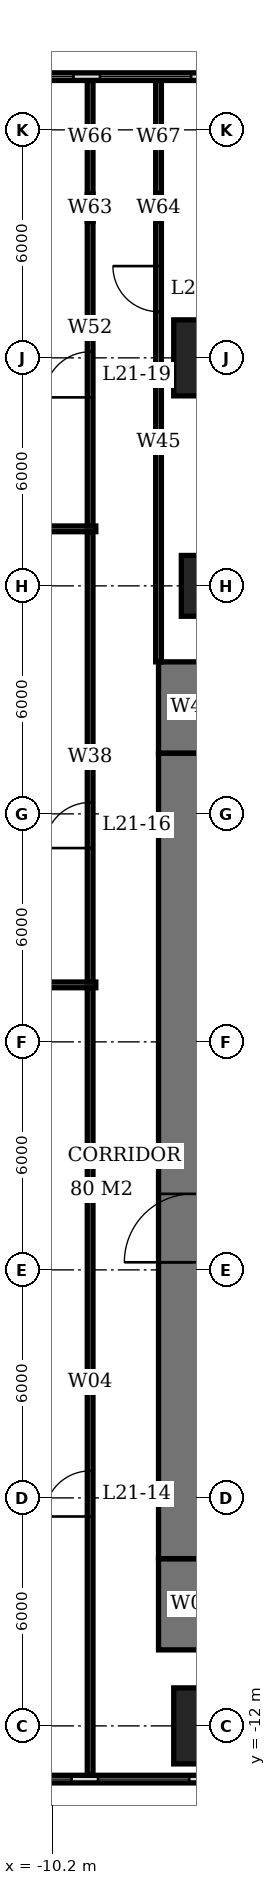
"""IFC4 building model, lengths in metres.
Left out: names, types, materials, properties, quantities, classifications, styles, units other than length and angle.
Written with IfcOpenShell. Run it as: python <this file> out.ifc"""

import sys

from ifc_helpers import new_model, si_unit, direction, frame, frame_2d, origin, origin_2d, place, context, subcontext, project, spatial, rectangle, extrude, element, fill, save


model = new_model("IFC4")
c1 = context("Model", 3, precision=1e-05, world=origin(), true_north=direction((0.0, 1.0)))
c2 = subcontext(c1, "Body", "Model", "MODEL_VIEW")
j1 = project(units=[si_unit("LENGTHUNIT", "METRE"), si_unit("PLANEANGLEUNIT", "RADIAN")], contexts=[c1])
p1 = place(None, origin())
s1 = spatial("IfcSite", under=j1, at=p1, CompositionType="ELEMENT")
p2 = place(p1, origin())
s2 = spatial("IfcBuilding", under=s1, at=p2, CompositionType="ELEMENT")
p3 = place(p2, frame((0.0, 0.0, 88.4)))
s3 = spatial("IfcBuildingStorey", under=s2, at=p3, CompositionType="ELEMENT", Elevation=88.4)
p4 = place(p3, frame((-6.0, -12.0, 0.0), z_axis=(0.0, 0.0, 1.0), x_axis=(1.0, 0.0, 0.0)))
e1 = element("IfcColumn", 1, at=p4, inside=s3, PredefinedType="COLUMN", context=c2, shape_type="SweptSolid", body=[
    extrude(rectangle(XDim=2.0, YDim=2.0, at=origin_2d()), origin(), (0.0, 0.0, 1.0), 5.4),
])
p5 = place(p3, frame((-6.0, 18.0, 0.0), z_axis=(0.0, 0.0, 1.0), x_axis=(1.0, 0.0, 0.0)))
e2 = element("IfcColumn", 2, at=p5, inside=s3, PredefinedType="COLUMN", context=c2, shape_type="SweptSolid", body=[
    extrude(rectangle(XDim=1.6, YDim=1.6, at=origin_2d()), origin(), (0.0, 0.0, 1.0), 5.4),
])
p6 = place(p3, frame((-6.0, 24.0, 0.0), z_axis=(0.0, 0.0, 1.0), x_axis=(1.0, 0.0, 0.0)))
e3 = element("IfcColumn", 3, at=p6, inside=s3, PredefinedType="COLUMN", context=c2, shape_type="SweptSolid", body=[
    extrude(rectangle(XDim=2.0, YDim=2.0, at=origin_2d()), origin(), (0.0, 0.0, 1.0), 5.4),
])
p7 = place(p3, frame((-6.5, -7.6, 0.0), z_axis=(0.0, 0.0, 1.0), x_axis=(0.0, 1.0, 0.0)))
e4 = element("IfcWall", 4, at=p7, inside=s3, PredefinedType="SHEAR", context=c2, shape_type="SweptSolid", body=[
    extrude(rectangle(XDim=21.2, YDim=1.8, at=frame_2d((10.6, 0.0))), origin(), (0.0, 0.0, 1.0), 5.4),
])
p8 = place(p7, frame((7.8, 0.0, 0.0)))
e5 = element("IfcOpeningElement", 5, at=p8, cuts=e4, PredefinedType="OPENING", context=c2, shape_type="SweptSolid", body=[
    extrude(rectangle(XDim=1.8, YDim=2.4, at=frame_2d((0.9, 1.2))), frame((0.0, 0.91, 0.0), z_axis=(0.0, -1.0, 0.0), x_axis=(1.0, 0.0, 0.0)), (0.0, 0.0, 1.0), 1.82),
])
for number, where, z_axis, x_axis in (
    (6, (-6.5, -10.0, 0.0), (0.0, 0.0, 1.0), (0.0, 1.0, 0.0)),
    (7, (-6.5, 13.6, 0.0), (0.0, 0.0, 1.0), (0.0, 1.0, 0.0)),
):
    element("IfcWall", number, at=place(p3, frame(where, z_axis=z_axis, x_axis=x_axis)), inside=s3, PredefinedType="SHEAR", context=c2, shape_type="SweptSolid", body=[
        extrude(rectangle(XDim=2.4, YDim=1.8, at=frame_2d((1.2, 0.0))), origin(), (0.0, 0.0, 1.0), 5.4),
    ])
p9 = place(p3, frame((-18.63, -13.4, 0.0), z_axis=(0.0, 0.0, 1.0), x_axis=(1.0, 0.0, 0.0)))
e8 = element("IfcWall", 8, at=p9, inside=s3, PredefinedType="USERDEFINED", context=c2, shape_type="SweptSolid", body=[
    extrude(rectangle(XDim=37.26, YDim=0.2, at=frame_2d((18.63, 0.0))), origin(), (0.0, 0.0, 1.0), 5.4),
])
p10 = place(p9, frame((0.348, 0.0, 0.6)))
e9 = element("IfcOpeningElement", 9, at=p10, cuts=e8, PredefinedType="OPENING", context=c2, shape_type="SweptSolid", body=[
    extrude(rectangle(XDim=2.4, YDim=3.0, at=frame_2d((1.2, 1.5))), frame((0.0, 0.11, 0.0), z_axis=(0.0, -1.0, 0.0), x_axis=(1.0, 0.0, 0.0)), (0.0, 0.0, 1.0), 0.22),
])
p11 = place(p9, frame((3.445, 0.0, 0.6)))
e10 = element("IfcOpeningElement", 10, at=p11, cuts=e8, PredefinedType="OPENING", context=c2, shape_type="SweptSolid", body=[
    extrude(rectangle(XDim=2.4, YDim=3.0, at=frame_2d((1.2, 1.5))), frame((0.0, 0.11, 0.0), z_axis=(0.0, -1.0, 0.0), x_axis=(1.0, 0.0, 0.0)), (0.0, 0.0, 1.0), 0.22),
])
p12 = place(p9, frame((6.542, 0.0, 0.6)))
e11 = element("IfcOpeningElement", 11, at=p12, cuts=e8, PredefinedType="OPENING", context=c2, shape_type="SweptSolid", body=[
    extrude(rectangle(XDim=2.4, YDim=3.0, at=frame_2d((1.2, 1.5))), frame((0.0, 0.11, 0.0), z_axis=(0.0, -1.0, 0.0), x_axis=(1.0, 0.0, 0.0)), (0.0, 0.0, 1.0), 0.22),
])
p13 = place(p9, frame((9.638, 0.0, 0.6)))
e12 = element("IfcOpeningElement", 12, at=p13, cuts=e8, PredefinedType="OPENING", context=c2, shape_type="SweptSolid", body=[
    extrude(rectangle(XDim=2.4, YDim=3.0, at=frame_2d((1.2, 1.5))), frame((0.0, 0.11, 0.0), z_axis=(0.0, -1.0, 0.0), x_axis=(1.0, 0.0, 0.0)), (0.0, 0.0, 1.0), 0.22),
])
p14 = place(p9, frame((12.735, 0.0, 0.6)))
e13 = element("IfcOpeningElement", 13, at=p14, cuts=e8, PredefinedType="OPENING", context=c2, shape_type="SweptSolid", body=[
    extrude(rectangle(XDim=2.4, YDim=3.0, at=frame_2d((1.2, 1.5))), frame((0.0, 0.11, 0.0), z_axis=(0.0, -1.0, 0.0), x_axis=(1.0, 0.0, 0.0)), (0.0, 0.0, 1.0), 0.22),
])
p15 = place(p9, frame((16.582, 0.0, 0.0)))
e14 = element("IfcOpeningElement", 14, at=p15, cuts=e8, PredefinedType="OPENING", context=c2, shape_type="SweptSolid", body=[
    extrude(rectangle(XDim=1.0, YDim=2.1, at=frame_2d((0.5, 1.05))), frame((0.0, 0.11, 0.0), z_axis=(0.0, -1.0, 0.0), x_axis=(1.0, 0.0, 0.0)), (0.0, 0.0, 1.0), 0.22),
])
p16 = place(p9, frame((18.928, 0.0, 0.6)))
e15 = element("IfcOpeningElement", 15, at=p16, cuts=e8, PredefinedType="OPENING", context=c2, shape_type="SweptSolid", body=[
    extrude(rectangle(XDim=2.4, YDim=3.0, at=frame_2d((1.2, 1.5))), frame((0.0, 0.11, 0.0), z_axis=(0.0, -1.0, 0.0), x_axis=(1.0, 0.0, 0.0)), (0.0, 0.0, 1.0), 0.22),
])
p17 = place(p9, frame((22.025, 0.0, 0.6)))
e16 = element("IfcOpeningElement", 16, at=p17, cuts=e8, PredefinedType="OPENING", context=c2, shape_type="SweptSolid", body=[
    extrude(rectangle(XDim=2.4, YDim=3.0, at=frame_2d((1.2, 1.5))), frame((0.0, 0.11, 0.0), z_axis=(0.0, -1.0, 0.0), x_axis=(1.0, 0.0, 0.0)), (0.0, 0.0, 1.0), 0.22),
])
p18 = place(p9, frame((25.122, 0.0, 0.6)))
e17 = element("IfcOpeningElement", 17, at=p18, cuts=e8, PredefinedType="OPENING", context=c2, shape_type="SweptSolid", body=[
    extrude(rectangle(XDim=2.4, YDim=3.0, at=frame_2d((1.2, 1.5))), frame((0.0, 0.11, 0.0), z_axis=(0.0, -1.0, 0.0), x_axis=(1.0, 0.0, 0.0)), (0.0, 0.0, 1.0), 0.22),
])
p19 = place(p9, frame((28.218, 0.0, 0.6)))
e18 = element("IfcOpeningElement", 18, at=p19, cuts=e8, PredefinedType="OPENING", context=c2, shape_type="SweptSolid", body=[
    extrude(rectangle(XDim=2.4, YDim=3.0, at=frame_2d((1.2, 1.5))), frame((0.0, 0.11, 0.0), z_axis=(0.0, -1.0, 0.0), x_axis=(1.0, 0.0, 0.0)), (0.0, 0.0, 1.0), 0.22),
])
p20 = place(p9, frame((31.315, 0.0, 0.6)))
e19 = element("IfcOpeningElement", 19, at=p20, cuts=e8, PredefinedType="OPENING", context=c2, shape_type="SweptSolid", body=[
    extrude(rectangle(XDim=2.4, YDim=3.0, at=frame_2d((1.2, 1.5))), frame((0.0, 0.11, 0.0), z_axis=(0.0, -1.0, 0.0), x_axis=(1.0, 0.0, 0.0)), (0.0, 0.0, 1.0), 0.22),
])
p21 = place(p9, frame((34.412, 0.0, 0.6)))
e20 = element("IfcOpeningElement", 20, at=p21, cuts=e8, PredefinedType="OPENING", context=c2, shape_type="SweptSolid", body=[
    extrude(rectangle(XDim=2.4, YDim=3.0, at=frame_2d((1.2, 1.5))), frame((0.0, 0.11, 0.0), z_axis=(0.0, -1.0, 0.0), x_axis=(1.0, 0.0, 0.0)), (0.0, 0.0, 1.0), 0.22),
])
p22 = place(p3, frame((18.58, 31.4, 0.0), z_axis=(0.0, 0.0, 1.0), x_axis=(-1.0, 0.0, 0.0)))
e21 = element("IfcWall", 21, at=p22, inside=s3, PredefinedType="USERDEFINED", context=c2, shape_type="SweptSolid", body=[
    extrude(rectangle(XDim=37.16, YDim=0.2, at=frame_2d((18.58, 0.0))), origin(), (0.0, 0.0, 1.0), 5.4),
])
p23 = place(p22, frame((0.348, 0.0, 0.6)))
e22 = element("IfcOpeningElement", 22, at=p23, cuts=e21, PredefinedType="OPENING", context=c2, shape_type="SweptSolid", body=[
    extrude(rectangle(XDim=2.4, YDim=3.0, at=frame_2d((1.2, 1.5))), frame((0.0, 0.11, 0.0), z_axis=(0.0, -1.0, 0.0), x_axis=(1.0, 0.0, 0.0)), (0.0, 0.0, 1.0), 0.22),
])
p24 = place(p22, frame((3.445, 0.0, 0.6)))
e23 = element("IfcOpeningElement", 23, at=p24, cuts=e21, PredefinedType="OPENING", context=c2, shape_type="SweptSolid", body=[
    extrude(rectangle(XDim=2.4, YDim=3.0, at=frame_2d((1.2, 1.5))), frame((0.0, 0.11, 0.0), z_axis=(0.0, -1.0, 0.0), x_axis=(1.0, 0.0, 0.0)), (0.0, 0.0, 1.0), 0.22),
])
p25 = place(p22, frame((6.542, 0.0, 0.6)))
e24 = element("IfcOpeningElement", 24, at=p25, cuts=e21, PredefinedType="OPENING", context=c2, shape_type="SweptSolid", body=[
    extrude(rectangle(XDim=2.4, YDim=3.0, at=frame_2d((1.2, 1.5))), frame((0.0, 0.11, 0.0), z_axis=(0.0, -1.0, 0.0), x_axis=(1.0, 0.0, 0.0)), (0.0, 0.0, 1.0), 0.22),
])
p26 = place(p22, frame((9.638, 0.0, 0.6)))
e25 = element("IfcOpeningElement", 25, at=p26, cuts=e21, PredefinedType="OPENING", context=c2, shape_type="SweptSolid", body=[
    extrude(rectangle(XDim=2.4, YDim=3.0, at=frame_2d((1.2, 1.5))), frame((0.0, 0.11, 0.0), z_axis=(0.0, -1.0, 0.0), x_axis=(1.0, 0.0, 0.0)), (0.0, 0.0, 1.0), 0.22),
])
p27 = place(p22, frame((12.735, 0.0, 0.6)))
e26 = element("IfcOpeningElement", 26, at=p27, cuts=e21, PredefinedType="OPENING", context=c2, shape_type="SweptSolid", body=[
    extrude(rectangle(XDim=2.4, YDim=3.0, at=frame_2d((1.2, 1.5))), frame((0.0, 0.11, 0.0), z_axis=(0.0, -1.0, 0.0), x_axis=(1.0, 0.0, 0.0)), (0.0, 0.0, 1.0), 0.22),
])
p28 = place(p22, frame((15.832, 0.0, 0.6)))
e27 = element("IfcOpeningElement", 27, at=p28, cuts=e21, PredefinedType="OPENING", context=c2, shape_type="SweptSolid", body=[
    extrude(rectangle(XDim=2.4, YDim=3.0, at=frame_2d((1.2, 1.5))), frame((0.0, 0.11, 0.0), z_axis=(0.0, -1.0, 0.0), x_axis=(1.0, 0.0, 0.0)), (0.0, 0.0, 1.0), 0.22),
])
p29 = place(p22, frame((18.928, 0.0, 0.6)))
e28 = element("IfcOpeningElement", 28, at=p29, cuts=e21, PredefinedType="OPENING", context=c2, shape_type="SweptSolid", body=[
    extrude(rectangle(XDim=2.4, YDim=3.0, at=frame_2d((1.2, 1.5))), frame((0.0, 0.11, 0.0), z_axis=(0.0, -1.0, 0.0), x_axis=(1.0, 0.0, 0.0)), (0.0, 0.0, 1.0), 0.22),
])
p30 = place(p22, frame((22.025, 0.0, 0.6)))
e29 = element("IfcOpeningElement", 29, at=p30, cuts=e21, PredefinedType="OPENING", context=c2, shape_type="SweptSolid", body=[
    extrude(rectangle(XDim=2.4, YDim=3.0, at=frame_2d((1.2, 1.5))), frame((0.0, 0.11, 0.0), z_axis=(0.0, -1.0, 0.0), x_axis=(1.0, 0.0, 0.0)), (0.0, 0.0, 1.0), 0.22),
])
p31 = place(p22, frame((25.122, 0.0, 0.6)))
e30 = element("IfcOpeningElement", 30, at=p31, cuts=e21, PredefinedType="OPENING", context=c2, shape_type="SweptSolid", body=[
    extrude(rectangle(XDim=2.4, YDim=3.0, at=frame_2d((1.2, 1.5))), frame((0.0, 0.11, 0.0), z_axis=(0.0, -1.0, 0.0), x_axis=(1.0, 0.0, 0.0)), (0.0, 0.0, 1.0), 0.22),
])
p32 = place(p22, frame((28.218, 0.0, 0.6)))
e31 = element("IfcOpeningElement", 31, at=p32, cuts=e21, PredefinedType="OPENING", context=c2, shape_type="SweptSolid", body=[
    extrude(rectangle(XDim=2.4, YDim=3.0, at=frame_2d((1.2, 1.5))), frame((0.0, 0.11, 0.0), z_axis=(0.0, -1.0, 0.0), x_axis=(1.0, 0.0, 0.0)), (0.0, 0.0, 1.0), 0.22),
])
p33 = place(p22, frame((31.315, 0.0, 0.6)))
e32 = element("IfcOpeningElement", 32, at=p33, cuts=e21, PredefinedType="OPENING", context=c2, shape_type="SweptSolid", body=[
    extrude(rectangle(XDim=2.4, YDim=3.0, at=frame_2d((1.2, 1.5))), frame((0.0, 0.11, 0.0), z_axis=(0.0, -1.0, 0.0), x_axis=(1.0, 0.0, 0.0)), (0.0, 0.0, 1.0), 0.22),
])
p34 = place(p22, frame((34.412, 0.0, 0.6)))
e33 = element("IfcOpeningElement", 33, at=p34, cuts=e21, PredefinedType="OPENING", context=c2, shape_type="SweptSolid", body=[
    extrude(rectangle(XDim=2.4, YDim=3.0, at=frame_2d((1.2, 1.5))), frame((0.0, 0.11, 0.0), z_axis=(0.0, -1.0, 0.0), x_axis=(1.0, 0.0, 0.0)), (0.0, 0.0, 1.0), 0.22),
])
p35 = place(p3, frame((-21.59, 7.5, 0.0), z_axis=(0.0, 0.0, 1.0), x_axis=(1.0, 0.0, 0.0)))
e34 = element("IfcWall", 34, at=p35, inside=s3, PredefinedType="PARTITIONING", context=c2, shape_type="SweptSolid", body=[
    extrude(rectangle(XDim=12.54, YDim=0.15, at=frame_2d((6.27, 0.0))), origin(), (0.0, 0.0, 1.0), 5.15),
])
p36 = place(p3, frame((-17.708, 19.5, 0.0), z_axis=(0.0, 0.0, 1.0), x_axis=(1.0, 0.0, 0.0)))
e35 = element("IfcWall", 35, at=p36, inside=s3, PredefinedType="PARTITIONING", context=c2, shape_type="SweptSolid", body=[
    extrude(rectangle(XDim=8.658, YDim=0.15, at=frame_2d((4.329, 0.0))), origin(), (0.0, 0.0, 1.0), 5.15),
])
p37 = place(p3, frame((-9.2, -13.3, 0.0), z_axis=(0.0, 0.0, 1.0), x_axis=(0.0, 1.0, 0.0)))
e36 = element("IfcWall", 36, at=p37, inside=s3, PredefinedType="PARTITIONING", context=c2, shape_type="SweptSolid", body=[
    extrude(rectangle(XDim=20.725, YDim=0.15, at=frame_2d((10.363, 0.0))), origin(), (0.0, 0.0, 1.0), 5.15),
])
p38 = place(p37, frame((6.81, 0.0, 0.0)))
e37 = element("IfcOpeningElement", 37, at=p38, cuts=e36, PredefinedType="OPENING", context=c2, shape_type="SweptSolid", body=[
    extrude(rectangle(XDim=1.2, YDim=2.4, at=frame_2d((0.6, 1.2))), frame((0.0, 0.085, 0.0), z_axis=(0.0, -1.0, 0.0), x_axis=(1.0, 0.0, 0.0)), (0.0, 0.0, 1.0), 0.17),
])
p39 = place(p3, frame((-9.2, 7.575, 0.0), z_axis=(0.0, 0.0, 1.0), x_axis=(0.0, 1.0, 0.0)))
e38 = element("IfcWall", 38, at=p39, inside=s3, PredefinedType="PARTITIONING", context=c2, shape_type="SweptSolid", body=[
    extrude(rectangle(XDim=11.85, YDim=0.15, at=frame_2d((5.925, 0.0))), origin(), (0.0, 0.0, 1.0), 5.15),
])
p40 = place(p39, frame((3.525, 0.0, 0.0)))
e39 = element("IfcOpeningElement", 39, at=p40, cuts=e38, PredefinedType="OPENING", context=c2, shape_type="SweptSolid", body=[
    extrude(rectangle(XDim=1.2, YDim=2.4, at=frame_2d((0.6, 1.2))), frame((0.0, 0.085, 0.0), z_axis=(0.0, -1.0, 0.0), x_axis=(1.0, 0.0, 0.0)), (0.0, 0.0, 1.0), 0.17),
])
p41 = place(p3, frame((-9.2, 19.575, 0.0), z_axis=(0.0, 0.0, 1.0), x_axis=(0.0, 1.0, 0.0)))
e40 = element("IfcWall", 40, at=p41, inside=s3, PredefinedType="PARTITIONING", context=c2, shape_type="SweptSolid", body=[
    extrude(rectangle(XDim=8.015, YDim=0.15, at=frame_2d((4.008, 0.0))), origin(), (0.0, 0.0, 1.0), 5.15),
])
p42 = place(p41, frame((3.385, 0.0, 0.0)))
e41 = element("IfcOpeningElement", 41, at=p42, cuts=e40, PredefinedType="OPENING", context=c2, shape_type="SweptSolid", body=[
    extrude(rectangle(XDim=1.2, YDim=2.4, at=frame_2d((0.6, 1.2))), frame((0.0, 0.085, 0.0), z_axis=(0.0, -1.0, 0.0), x_axis=(1.0, 0.0, 0.0)), (0.0, 0.0, 1.0), 0.17),
])
p43 = place(p3, frame((-9.2, 27.59, 0.0), z_axis=(0.0, 0.0, 1.0), x_axis=(0.0, 1.0, 0.0)))
e42 = element("IfcWall", 42, at=p43, inside=s3, PredefinedType="PARTITIONING", context=c2, shape_type="SweptSolid", body=[
    extrude(rectangle(XDim=0.72, YDim=0.15, at=frame_2d((0.36, 0.0))), origin(), (0.0, 0.0, 1.0), 4.15),
])
p44 = place(p3, frame((-9.2, 28.31, 0.0), z_axis=(0.0, 0.0, 1.0), x_axis=(0.0, 1.0, 0.0)))
e43 = element("IfcWall", 43, at=p44, inside=s3, PredefinedType="PARTITIONING", context=c2, shape_type="SweptSolid", body=[
    extrude(rectangle(XDim=2.99, YDim=0.15, at=frame_2d((1.495, 0.0))), origin(), (0.0, 0.0, 1.0), 5.15),
])
p45 = place(p3, frame((-7.4, 16.0, 0.0), z_axis=(0.0, 0.0, 1.0), x_axis=(0.0, 1.0, 0.0)))
e44 = element("IfcWall", 44, at=p45, inside=s3, PredefinedType="PARTITIONING", context=c2, shape_type="SweptSolid", body=[
    extrude(rectangle(XDim=11.59, YDim=0.15, at=frame_2d((5.795, 0.0))), origin(), (0.0, 0.0, 1.0), 5.15),
])
p46 = place(p45, frame((9.215, 0.0, 0.0)))
e45 = element("IfcOpeningElement", 45, at=p46, cuts=e44, PredefinedType="OPENING", context=c2, shape_type="SweptSolid", body=[
    extrude(rectangle(XDim=1.2, YDim=2.4, at=frame_2d((0.6, 1.2))), frame((0.0, 0.085, 0.0), z_axis=(0.0, -1.0, 0.0), x_axis=(1.0, 0.0, 0.0)), (0.0, 0.0, 1.0), 0.17),
])
p47 = place(p3, frame((-7.4, 27.59, 0.0), z_axis=(0.0, 0.0, 1.0), x_axis=(0.0, 1.0, 0.0)))
e46 = element("IfcWall", 46, at=p47, inside=s3, PredefinedType="PARTITIONING", context=c2, shape_type="SweptSolid", body=[
    extrude(rectangle(XDim=0.72, YDim=0.15, at=frame_2d((0.36, 0.0))), origin(), (0.0, 0.0, 1.0), 4.15),
])
p48 = place(p3, frame((-7.4, 28.31, 0.0), z_axis=(0.0, 0.0, 1.0), x_axis=(0.0, 1.0, 0.0)))
e47 = element("IfcWall", 47, at=p48, inside=s3, PredefinedType="PARTITIONING", context=c2, shape_type="SweptSolid", body=[
    extrude(rectangle(XDim=2.99, YDim=0.15, at=frame_2d((1.495, 0.0))), origin(), (0.0, 0.0, 1.0), 5.15),
])
p49 = place(p12, origin())
e48 = element("IfcWindow", 48, at=p49, inside=s3, PartitioningType="SINGLE_PANEL", PredefinedType="USERDEFINED", context=c2, shape_type="SweptSolid", body=[
    extrude(rectangle(XDim=2.4, YDim=3.0, at=frame_2d((1.2, 1.5))), frame((0.0, 0.03, 0.0), z_axis=(0.0, -1.0, 0.0), x_axis=(1.0, 0.0, 0.0)), (0.0, 0.0, 1.0), 0.06),
])
fill(e11, e48)
p50 = place(p13, origin())
e49 = element("IfcWindow", 49, at=p50, inside=s3, PartitioningType="SINGLE_PANEL", PredefinedType="USERDEFINED", context=c2, shape_type="SweptSolid", body=[
    extrude(rectangle(XDim=2.4, YDim=3.0, at=frame_2d((1.2, 1.5))), frame((0.0, 0.03, 0.0), z_axis=(0.0, -1.0, 0.0), x_axis=(1.0, 0.0, 0.0)), (0.0, 0.0, 1.0), 0.06),
])
fill(e12, e49)
p51 = place(p31, origin())
e50 = element("IfcWindow", 50, at=p51, inside=s3, PartitioningType="SINGLE_PANEL", PredefinedType="USERDEFINED", context=c2, shape_type="SweptSolid", body=[
    extrude(rectangle(XDim=2.4, YDim=3.0, at=frame_2d((1.2, 1.5))), frame((0.0, 0.03, 0.0), z_axis=(0.0, -1.0, 0.0), x_axis=(1.0, 0.0, 0.0)), (0.0, 0.0, 1.0), 0.06),
])
fill(e30, e50)
p52 = place(p32, origin())
e51 = element("IfcWindow", 51, at=p52, inside=s3, PartitioningType="SINGLE_PANEL", PredefinedType="USERDEFINED", context=c2, shape_type="SweptSolid", body=[
    extrude(rectangle(XDim=2.4, YDim=3.0, at=frame_2d((1.2, 1.5))), frame((0.0, 0.03, 0.0), z_axis=(0.0, -1.0, 0.0), x_axis=(1.0, 0.0, 0.0)), (0.0, 0.0, 1.0), 0.06),
])
fill(e31, e51)
p53 = place(p8, origin())
e52 = element("IfcDoor", 52, at=p53, inside=s3, OperationType="DOUBLE_DOOR_SINGLE_SWING", PredefinedType="DOOR", context=c2, shape_type="SweptSolid", body=[
    extrude(rectangle(XDim=1.8, YDim=2.4, at=frame_2d((0.9, 1.2))), frame((0.0, 0.025, 0.0), z_axis=(0.0, -1.0, 0.0), x_axis=(1.0, 0.0, 0.0)), (0.0, 0.0, 1.0), 0.05),
])
fill(e5, e52)
p54 = place(p38, origin())
e53 = element("IfcDoor", 53, at=p54, inside=s3, OperationType="SINGLE_SWING_LEFT", PredefinedType="DOOR", context=c2, shape_type="SweptSolid", body=[
    extrude(rectangle(XDim=1.2, YDim=2.4, at=frame_2d((0.6, 1.2))), frame((0.0, 0.025, 0.0), z_axis=(0.0, -1.0, 0.0), x_axis=(1.0, 0.0, 0.0)), (0.0, 0.0, 1.0), 0.05),
])
fill(e37, e53)
p55 = place(p40, origin())
e54 = element("IfcDoor", 54, at=p55, inside=s3, OperationType="SINGLE_SWING_LEFT", PredefinedType="DOOR", context=c2, shape_type="SweptSolid", body=[
    extrude(rectangle(XDim=1.2, YDim=2.4, at=frame_2d((0.6, 1.2))), frame((0.0, 0.025, 0.0), z_axis=(0.0, -1.0, 0.0), x_axis=(1.0, 0.0, 0.0)), (0.0, 0.0, 1.0), 0.05),
])
fill(e39, e54)
p56 = place(p46, origin())
e55 = element("IfcDoor", 55, at=p56, inside=s3, OperationType="SINGLE_SWING_RIGHT", PredefinedType="DOOR", context=c2, shape_type="SweptSolid", body=[
    extrude(rectangle(XDim=1.2, YDim=2.4, at=frame_2d((0.6, 1.2))), frame((0.0, 0.025, 0.0), z_axis=(0.0, -1.0, 0.0), x_axis=(1.0, 0.0, 0.0)), (0.0, 0.0, 1.0), 0.05),
])
fill(e45, e55)
p57 = place(p42, origin())
e56 = element("IfcDoor", 56, at=p57, inside=s3, OperationType="SINGLE_SWING_LEFT", PredefinedType="DOOR", context=c2, shape_type="SweptSolid", body=[
    extrude(rectangle(XDim=1.2, YDim=2.4, at=frame_2d((0.6, 1.2))), frame((0.0, 0.025, 0.0), z_axis=(0.0, -1.0, 0.0), x_axis=(1.0, 0.0, 0.0)), (0.0, 0.0, 1.0), 0.05),
])
fill(e41, e56)
save(model, sys.argv[1])
